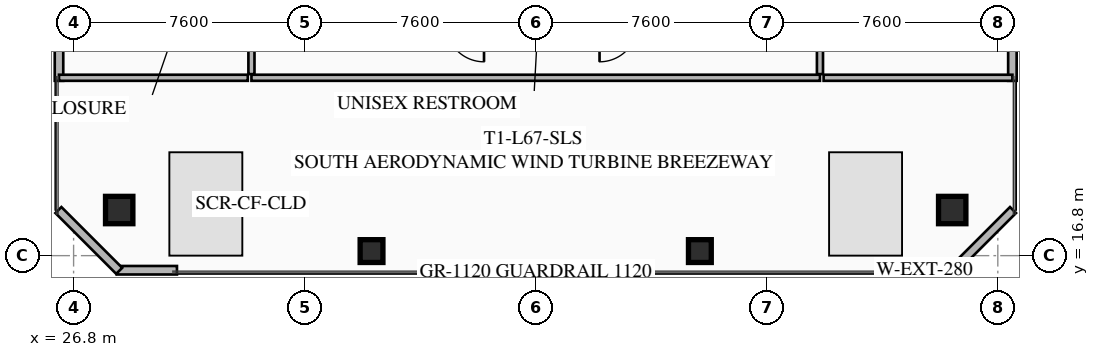
"""IFC4 building model, lengths in metres.
Left out: names, types, materials, properties, quantities, classifications, styles, units other than length and angle.
Written with IfcOpenShell. Run it as: python <this file> out.ifc"""

import sys

from ifc_helpers import new_model, si_unit, direction, frame, frame_2d, origin, origin_2d, place, context, subcontext, project, spatial, rectangle, hollow_rectangle, extrude, element, save


model = new_model("IFC4")
c1 = context("Model", 3, precision=1e-05, world=origin(), true_north=direction((0.0, 1.0)))
c2 = subcontext(c1, "Body", "Model", "MODEL_VIEW")
j1 = project(units=[si_unit("LENGTHUNIT", "METRE"), si_unit("PLANEANGLEUNIT", "RADIAN")], contexts=[c1])
p1 = place(None, origin())
s1 = spatial("IfcSite", under=j1, at=p1, CompositionType="ELEMENT")
p2 = place(p1, origin())
s2 = spatial("IfcBuilding", under=s1, at=p2, CompositionType="ELEMENT")
p3 = place(p2, frame((0.0, 0.0, 246.8)))
s3 = spatial("IfcBuildingStorey", under=s2, at=p3, CompositionType="ELEMENT", Elevation=246.8)
for number, where, z_axis, x_axis in (
    (1, (28.3, 18.3, 0.0), (0.0, 0.0, 1.0), (1.0, 0.0, 0.0)),
    (2, (55.7, 18.3, 0.0), (0.0, 0.0, 1.0), (1.0, 0.0, 0.0)),
):
    element("IfcColumn", number, at=place(p3, frame(where, z_axis=z_axis, x_axis=x_axis)), inside=s3, PredefinedType="COLUMN", context=c2, shape_type="SweptSolid", body=[
        extrude(hollow_rectangle(XDim=0.9, YDim=0.9, WallThickness=0.04, at=origin_2d()), origin(), (0.0, 0.0, 1.0), 4.38),
    ])
for number, where, z_axis, x_axis in (
    (3, (36.6, 16.95, 0.0), (0.0, 0.0, 1.0), (1.0, 0.0, 0.0)),
    (4, (47.4, 16.95, 0.0), (0.0, 0.0, 1.0), (1.0, 0.0, 0.0)),
):
    element("IfcColumn", number, at=place(p3, frame(where, z_axis=z_axis, x_axis=x_axis)), inside=s3, PredefinedType="COLUMN", context=c2, shape_type="SweptSolid", body=[
        extrude(hollow_rectangle(XDim=0.75, YDim=0.75, WallThickness=0.032, at=origin_2d()), origin(), (0.0, 0.0, 1.0), 4.38),
    ])
for number, where, z_axis, x_axis in (
    (5, (55.78, 16.32, 0.0), (0.0, 0.0, 1.0), (-1.0, 0.0, 0.0)),
    (6, (30.2, 16.32, 0.0), (0.0, 0.0, 1.0), (-1.0, 0.0, 0.0)),
):
    element("IfcWall", number, at=place(p3, frame(where, z_axis=z_axis, x_axis=x_axis)), inside=s3, PredefinedType="SOLIDWALL", context=c2, shape_type="SweptSolid", body=[
        extrude(rectangle(XDim=1.98, YDim=0.28, at=frame_2d((0.99, 0.0))), origin(), (0.0, 0.0, 1.0), 4.38),
    ])
for number, where, z_axis, x_axis in (
    (7, (26.32, 22.55, 0.0), (0.0, 0.0, 1.0), (0.0, 1.0, 0.0)),
    (8, (57.68, 41.45, 0.0), (0.0, 0.0, 1.0), (0.0, -1.0, 0.0)),
):
    element("IfcWall", number, at=place(p3, frame(where, z_axis=z_axis, x_axis=x_axis)), inside=s3, PredefinedType="SOLIDWALL", context=c2, shape_type="SweptSolid", body=[
        extrude(rectangle(XDim=18.9, YDim=0.28, at=frame_2d((9.45, 0.0))), origin(), (0.0, 0.0, 1.0), 4.38),
    ])
for number, where, z_axis, x_axis in (
    (9, (28.3, 16.3, 0.0), (0.0, 0.0, 1.0), (-0.707, 0.707, 0.0)),
    (10, (57.7, 18.3, 0.0), (0.0, 0.0, 1.0), (-0.707, -0.707, 0.0)),
):
    element("IfcWall", number, at=place(p3, frame(where, z_axis=z_axis, x_axis=x_axis)), inside=s3, PredefinedType="SOLIDWALL", context=c2, shape_type="SweptSolid", body=[
        extrude(rectangle(XDim=2.828, YDim=0.28, at=frame_2d((1.414, 0.0))), origin(), (0.0, 0.0, 1.0), 4.38),
    ])
p4 = place(p3, frame((51.35, 22.65, 0.0), z_axis=(0.0, 0.0, 1.0), x_axis=(-1.0, 0.0, 0.0)))
e11 = element("IfcWall", 11, at=p4, inside=s3, PredefinedType="SOLIDWALL", context=c2, shape_type="SweptSolid", body=[
    extrude(rectangle(XDim=18.7, YDim=0.2, at=frame_2d((9.35, 0.0))), origin(), (0.0, 0.0, 1.0), 3.491),
])
p5 = place(p3, frame((51.35, 41.23, 0.0), z_axis=(0.0, 0.0, 1.0), x_axis=(0.0, -1.0, 0.0)))
e12 = element("IfcWall", 12, at=p5, inside=s3, PredefinedType="SOLIDWALL", context=c2, shape_type="SweptSolid", body=[
    extrude(rectangle(XDim=18.46, YDim=0.2, at=frame_2d((9.23, 0.0))), origin(), (0.0, 0.0, 1.0), 3.491),
])
p6 = place(p5, frame((2.2, 0.0, 0.0)))
e13 = element("IfcOpeningElement", 13, at=p6, cuts=e12, PredefinedType="OPENING", context=c2, shape_type="SweptSolid", body=[
    extrude(rectangle(XDim=1.25, YDim=2.25, at=frame_2d((0.625, 1.125))), frame((0.0, 0.11, 0.0), z_axis=(0.0, -1.0, 0.0), x_axis=(1.0, 0.0, 0.0)), (0.0, 0.0, 1.0), 0.22),
])
p7 = place(p5, frame((8.6, 0.0, 0.0)))
e14 = element("IfcOpeningElement", 14, at=p7, cuts=e12, PredefinedType="OPENING", context=c2, shape_type="SweptSolid", body=[
    extrude(rectangle(XDim=1.15, YDim=2.2, at=frame_2d((0.575, 1.1))), frame((0.0, 0.11, 0.0), z_axis=(0.0, -1.0, 0.0), x_axis=(1.0, 0.0, 0.0)), (0.0, 0.0, 1.0), 0.22),
])
p8 = place(p5, frame((16.0, 0.0, 0.0)))
e15 = element("IfcOpeningElement", 15, at=p8, cuts=e12, PredefinedType="OPENING", context=c2, shape_type="SweptSolid", body=[
    extrude(rectangle(XDim=1.15, YDim=2.2, at=frame_2d((0.575, 1.1))), frame((0.0, 0.11, 0.0), z_axis=(0.0, -1.0, 0.0), x_axis=(1.0, 0.0, 0.0)), (0.0, 0.0, 1.0), 0.22),
])
p9 = place(p3, frame((32.65, 22.77, 0.0), z_axis=(0.0, 0.0, 1.0), x_axis=(0.0, 1.0, 0.0)))
e16 = element("IfcWall", 16, at=p9, inside=s3, PredefinedType="SOLIDWALL", context=c2, shape_type="SweptSolid", body=[
    extrude(rectangle(XDim=5.83, YDim=0.2, at=frame_2d((2.915, 0.0))), origin(), (0.0, 0.0, 1.0), 3.491),
])
p10 = place(p9, frame((2.2, 0.0, 0.0)))
e17 = element("IfcOpeningElement", 17, at=p10, cuts=e16, PredefinedType="OPENING", context=c2, shape_type="SweptSolid", body=[
    extrude(rectangle(XDim=1.25, YDim=2.25, at=frame_2d((0.625, 1.125))), frame((0.0, 0.11, 0.0), z_axis=(0.0, -1.0, 0.0), x_axis=(1.0, 0.0, 0.0)), (0.0, 0.0, 1.0), 0.22),
])
for number, where, z_axis, x_axis in (
    (18, (51.47, 22.65, 0.0), (0.0, 0.0, 1.0), (1.0, 0.0, 0.0)),
    (19, (26.32, 22.65, 0.0), (0.0, 0.0, 1.0), (1.0, 0.0, 0.0)),
):
    element("IfcWall", number, at=place(p3, frame(where, z_axis=z_axis, x_axis=x_axis)), inside=s3, PredefinedType="SOLIDWALL", context=c2, shape_type="SweptSolid", body=[
        extrude(rectangle(XDim=6.21, YDim=0.2, at=frame_2d((3.105, 0.0))), origin(), (0.0, 0.0, 1.0), 3.491),
    ])
save(model, sys.argv[1])
